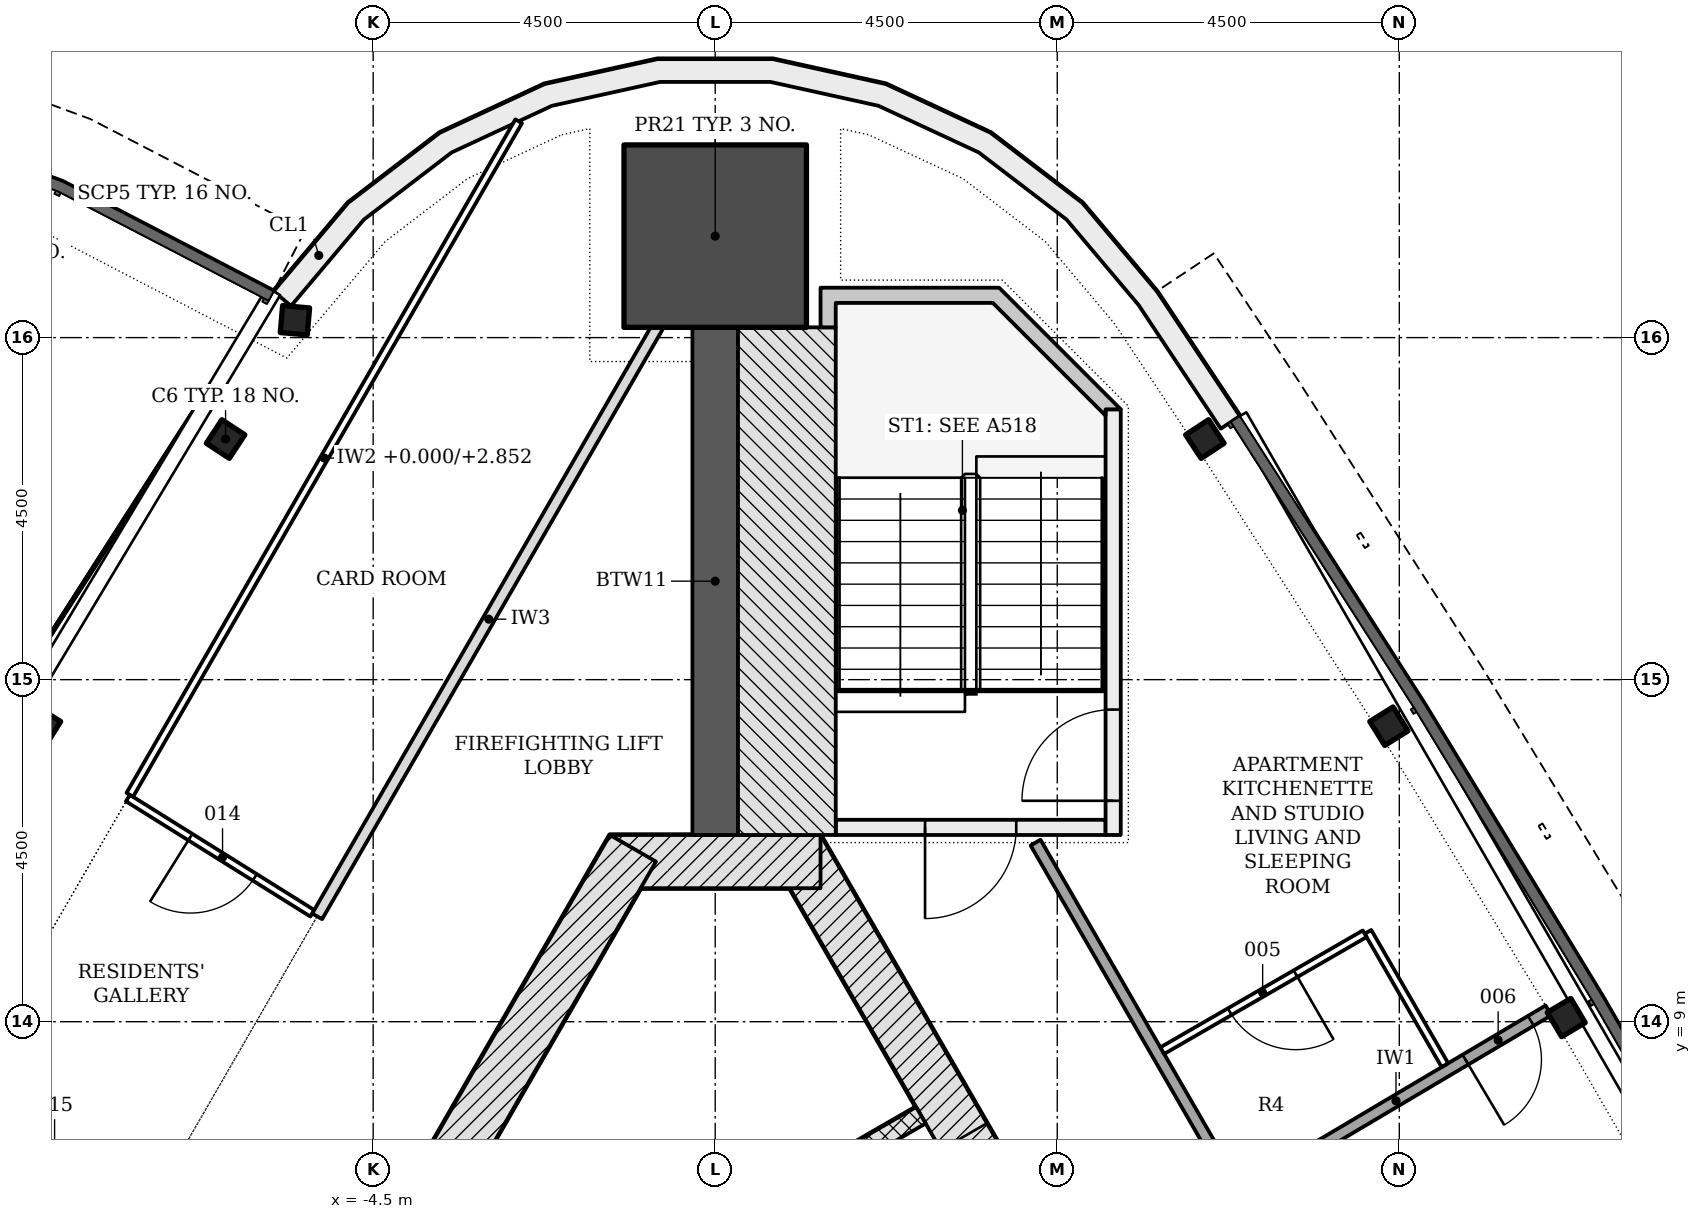
"""IFC4 building model, lengths in metres.
Left out: names, types, materials, properties, quantities, classifications, styles, units other than length and angle.
Written with IfcOpenShell. Run it as: python <this file> out.ifc"""

import sys

from ifc_helpers import new_model, si_unit, direction, frame, frame_2d, origin, origin_2d, place, context, subcontext, project, spatial, polyline, rectangle, hollow_rectangle, i_section, outline, extrude, element, fill, save


model = new_model("IFC4")
c1 = context("Model", 3, precision=1e-05, world=origin(), true_north=direction((0.0, 1.0)))
c2 = subcontext(c1, "Body", "Model", "MODEL_VIEW")
j1 = project(units=[si_unit("LENGTHUNIT", "METRE"), si_unit("PLANEANGLEUNIT", "RADIAN")], contexts=[c1])
p1 = place(None, origin())
s1 = spatial("IfcSite", under=j1, at=p1, CompositionType="ELEMENT")
p2 = place(p1, origin())
s2 = spatial("IfcBuilding", under=s1, at=p2, CompositionType="ELEMENT")
p3 = place(p2, frame((0.0, 0.0, 263.4)))
s3 = spatial("IfcBuildingStorey", under=s2, at=p3, CompositionType="ELEMENT", Elevation=263.4)
p4 = place(p3, frame((10.311, -4.703, -0.2), z_axis=(0.0, 0.0, 1.0), x_axis=(-0.500001446645, 0.866024568562, 0.0)))
e1 = element("IfcWall", 1, at=p4, inside=s3, PredefinedType="SHEAR", context=c2, shape_type="SweptSolid", body=[
    extrude(rectangle(XDim=18.458, YDim=0.7, at=frame_2d((9.229, 0.0))), origin(), (0.0, 0.0, 1.0), 3.6),
])
p5 = place(p4, frame((4.379, 0.0, 0.2)))
e2 = element("IfcOpeningElement", 2, at=p5, cuts=e1, PredefinedType="OPENING", context=c2, shape_type="SweptSolid", body=[
    extrude(rectangle(XDim=1.1, YDim=2.1, at=frame_2d((0.55, 1.05))), frame((0.0, 0.36, 0.0), z_axis=(0.0, -1.0, 0.0), x_axis=(1.0, 0.0, 0.0)), (0.0, 0.0, 1.0), 0.72),
])
p6 = place(p4, frame((6.529, 0.0, 0.2)))
e3 = element("IfcOpeningElement", 3, at=p6, cuts=e1, PredefinedType="OPENING", context=c2, shape_type="SweptSolid", body=[
    extrude(rectangle(XDim=1.1, YDim=2.1, at=frame_2d((0.55, 1.05))), frame((0.0, 0.36, 0.0), z_axis=(0.0, -1.0, 0.0), x_axis=(1.0, 0.0, 0.0)), (0.0, 0.0, 1.0), 0.72),
])
p7 = place(p4, frame((8.679, 0.0, 0.2)))
e4 = element("IfcOpeningElement", 4, at=p7, cuts=e1, PredefinedType="OPENING", context=c2, shape_type="SweptSolid", body=[
    extrude(rectangle(XDim=1.1, YDim=2.1, at=frame_2d((0.55, 1.05))), frame((0.0, 0.36, 0.0), z_axis=(0.0, -1.0, 0.0), x_axis=(1.0, 0.0, 0.0)), (0.0, 0.0, 1.0), 0.72),
])
p8 = place(p4, frame((10.829, 0.0, 0.2)))
e5 = element("IfcOpeningElement", 5, at=p8, cuts=e1, PredefinedType="OPENING", context=c2, shape_type="SweptSolid", body=[
    extrude(rectangle(XDim=1.1, YDim=2.1, at=frame_2d((0.55, 1.05))), frame((0.0, 0.36, 0.0), z_axis=(0.0, -1.0, 0.0), x_axis=(1.0, 0.0, 0.0)), (0.0, 0.0, 1.0), 0.72),
])
p9 = place(p4, frame((12.979, 0.0, 0.2)))
e6 = element("IfcOpeningElement", 6, at=p9, cuts=e1, PredefinedType="OPENING", context=c2, shape_type="SweptSolid", body=[
    extrude(rectangle(XDim=1.1, YDim=2.1, at=frame_2d((0.55, 1.05))), frame((0.0, 0.36, 0.0), z_axis=(0.0, -1.0, 0.0), x_axis=(1.0, 0.0, 0.0)), (0.0, 0.0, 1.0), 0.72),
])
p10 = place(p3, frame((1.386, 11.106, -0.2), z_axis=(0.0, 0.0, 1.0), x_axis=(-1.0, 0.0, 0.0)))
e7 = element("IfcWall", 7, at=p10, inside=s3, PredefinedType="SHEAR", context=c2, shape_type="SweptSolid", body=[
    extrude(rectangle(XDim=2.771, YDim=0.7, at=frame_2d((1.386, 0.0))), origin(), (0.0, 0.0, 1.0), 3.6),
])
p11 = place(p3, frame((-1.083, 11.281, -0.2), z_axis=(0.0, 0.0, 1.0), x_axis=(-0.500001446645, -0.866024568562, 0.0)))
e8 = element("IfcWall", 8, at=p11, inside=s3, PredefinedType="SHEAR", context=c2, shape_type="SweptSolid", body=[
    extrude(rectangle(XDim=18.458, YDim=0.7, at=frame_2d((9.229, 0.0))), origin(), (0.0, 0.0, 1.0), 3.6),
])
p12 = place(p11, frame((8.979, 0.0, 0.2)))
e9 = element("IfcOpeningElement", 9, at=p12, cuts=e8, PredefinedType="OPENING", context=c2, shape_type="SweptSolid", body=[
    extrude(rectangle(XDim=1.2, YDim=2.1, at=frame_2d((0.6, 1.05))), frame((0.0, 0.36, 0.0), z_axis=(0.0, -1.0, 0.0), x_axis=(1.0, 0.0, 0.0)), (0.0, 0.0, 1.0), 0.72),
])
p13 = place(p11, frame((11.029, 0.0, 0.2)))
e10 = element("IfcOpeningElement", 10, at=p13, cuts=e8, PredefinedType="OPENING", context=c2, shape_type="SweptSolid", body=[
    extrude(rectangle(XDim=1.2, YDim=2.1, at=frame_2d((0.6, 1.05))), frame((0.0, 0.36, 0.0), z_axis=(0.0, -1.0, 0.0), x_axis=(1.0, 0.0, 0.0)), (0.0, 0.0, 1.0), 0.72),
])
p14 = place(p3, frame((0.0, 11.456, -0.2), z_axis=(0.0, 0.0, 1.0), x_axis=(0.0, 1.0, 0.0)))
e11 = element("IfcWall", 11, at=p14, inside=s3, PredefinedType="SHEAR", context=c2, shape_type="SweptSolid", body=[
    extrude(rectangle(XDim=6.679, YDim=0.6, at=frame_2d((3.339, 0.0))), origin(), (0.0, 0.0, 1.0), 3.6),
])
p15 = place(p3, frame((0.0, 19.335, -0.2), z_axis=(0.0, 0.0, 1.0), x_axis=(0.0, 1.0, 0.0)))
e12 = element("IfcColumn", 12, at=p15, inside=s3, PredefinedType="COLUMN", context=c2, shape_type="SweptSolid", body=[
    extrude(rectangle(XDim=2.4, YDim=2.4, at=origin_2d()), origin(), (0.0, 0.0, 1.0), 3.6),
])
for number, where, z_axis, x_axis in (
    (13, (-6.442, 16.666, -0.2), (0.0, 0.0, 1.0), (-0.549, -0.836, 0.0)),
    (14, (-8.863, 12.888, -0.2), (0.0, 0.0, 1.0), (-0.53, -0.848, 0.0)),
    (15, (11.196, 9.055, -0.2), (0.0, 0.0, 1.0), (-0.51, 0.86, 0.0)),
    (16, (8.863, 12.888, -0.2), (0.0, 0.0, 1.0), (-0.53, 0.848, 0.0)),
    (17, (6.442, 16.666, -0.2), (0.0, 0.0, 1.0), (-0.549, 0.836, 0.0)),
):
    element("IfcColumn", number, at=place(p3, frame(where, z_axis=z_axis, x_axis=x_axis)), inside=s3, PredefinedType="COLUMN", context=c2, shape_type="SweptSolid", body=[
        extrude(i_section(OverallWidth=0.371, OverallDepth=0.361, WebThickness=0.012, FlangeThickness=0.02, FilletRadius=0.015, at=origin_2d()), origin(), (0.0, 0.0, 1.0), 3.6),
    ])
p16 = place(p3, frame((-5.529, 18.228, -0.2), z_axis=(0.0, 0.0, 1.0), x_axis=(-0.996283580932, 0.086133770183, 0.0)))
e18 = element("IfcColumn", 18, at=p16, inside=s3, PredefinedType="COLUMN", context=c2, shape_type="SweptSolid", body=[
    extrude(hollow_rectangle(XDim=0.356, YDim=0.356, WallThickness=0.013, at=origin_2d()), origin(), (0.0, 0.0, 1.0), 3.6),
])
p17 = place(p3, origin())
e19 = element("IfcWall", 19, at=p17, inside=s3, PredefinedType="NOTDEFINED", context=c2, shape_type="SweptSolid", body=[
    extrude(outline(polyline([(6.901, 16.968), (5.81, 18.61), (4.83, 19.771), (3.623, 20.695), (2.244, 21.335), (0.76, 21.664), (-0.76, 21.664), (-2.244, 21.335), (-3.623, 20.695), (-4.83, 19.771), (-5.81, 18.61), (-5.58, 18.416), (-4.622, 19.553), (-3.466, 20.437), (-2.147, 21.05), (-0.727, 21.364), (0.727, 21.364), (2.147, 21.05), (3.466, 20.437), (4.622, 19.553), (5.569, 18.429), (6.651, 16.802), (6.901, 16.968)])), origin(), (0.0, 0.0, 1.0), 3.3),
])
p18 = place(p3, frame((2.706, 7.769, -0.2), z_axis=(0.0, 0.0, 1.0), x_axis=(-0.866022959057, -0.500004234368, 0.0)))
e20 = element("IfcWall", 20, at=p18, inside=s3, PredefinedType="PARTITIONING", context=c2, shape_type="SweptSolid", body=[
    extrude(rectangle(XDim=2.5, YDim=0.25, at=frame_2d((1.25, 0.0))), origin(), (0.0, 0.0, 1.0), 3.6),
])
p19 = place(p3, frame((5.135, 11.556, -0.2), z_axis=(0.0, 0.0, 1.0), x_axis=(-1.0, 0.0, 0.0)))
e21 = element("IfcWall", 21, at=p19, inside=s3, PredefinedType="SHEAR", context=c2, shape_type="SweptSolid", body=[
    extrude(rectangle(XDim=3.55, YDim=0.2, at=frame_2d((1.775, 0.0))), origin(), (0.0, 0.0, 1.0), 3.6),
])
p20 = place(p19, frame((1.175, 0.0, 0.2)))
e22 = element("IfcOpeningElement", 22, at=p20, cuts=e21, PredefinedType="OPENING", context=c2, shape_type="SweptSolid", body=[
    extrude(rectangle(XDim=1.2, YDim=2.1, at=frame_2d((0.6, 1.05))), frame((0.0, 0.11, 0.0), z_axis=(0.0, -1.0, 0.0), x_axis=(1.0, 0.0, 0.0)), (0.0, 0.0, 1.0), 0.22),
])
p21 = place(p3, frame((5.236, 11.456, -0.2), z_axis=(0.0, 0.0, 1.0), x_axis=(0.0, 1.0, 0.0)))
e23 = element("IfcWall", 23, at=p21, inside=s3, PredefinedType="SHEAR", context=c2, shape_type="SweptSolid", body=[
    extrude(rectangle(XDim=5.6, YDim=0.2, at=frame_2d((2.8, 0.0))), origin(), (0.0, 0.0, 1.0), 3.6),
])
p22 = place(p21, frame((0.45, 0.0, 0.2)))
e24 = element("IfcOpeningElement", 24, at=p22, cuts=e23, PredefinedType="OPENING", context=c2, shape_type="SweptSolid", body=[
    extrude(rectangle(XDim=1.2, YDim=2.1, at=frame_2d((0.6, 1.05))), frame((0.0, 0.11, 0.0), z_axis=(0.0, -1.0, 0.0), x_axis=(1.0, 0.0, 0.0)), (0.0, 0.0, 1.0), 0.22),
])
p23 = place(p3, frame((0.943, 11.456, -0.2), z_axis=(0.0, 0.0, 1.0), x_axis=(0.0, 1.0, 0.0)))
e25 = element("IfcWall", 25, at=p23, inside=s3, PredefinedType="SHEAR", context=c2, shape_type="SweptSolid", body=[
    extrude(rectangle(XDim=6.679, YDim=1.286, at=frame_2d((3.339, 0.0))), origin(), (0.0, 0.0, 1.0), 3.6),
])
p24 = place(p3, frame((0.0, 0.0, -0.2)))
e26 = element("IfcWall", 26, at=p24, inside=s3, PredefinedType="SHEAR", context=c2, shape_type="SweptSolid", body=[
    extrude(outline(polyline([(5.336, 17.056), (3.736, 18.656), (1.385, 18.656), (1.385, 18.135), (1.586, 18.135), (1.586, 18.456), (3.653, 18.456), (5.135, 16.974), (5.135, 17.056), (5.135, 17.056), (5.135, 17.056), (5.135, 17.056), (5.135, 17.056), (5.135, 17.056), (5.135, 17.056), (5.135, 17.056), (5.135, 17.056), (5.135, 17.056), (5.135, 17.056), (5.135, 17.056), (5.135, 17.056), (5.135, 17.056), (5.135, 17.056), (5.135, 17.056), (5.135, 17.056), (5.336, 17.056)])), origin(), (0.0, 0.0, 1.0), 3.6),
])
p25 = place(p3, frame((6.885, 6.731, 0.0), z_axis=(0.0, 0.0, 1.0), x_axis=(-0.500003399299, 0.866023441189, 0.0)))
e27 = element("IfcWall", 27, at=p25, inside=s3, PredefinedType="PARTITIONING", context=c2, shape_type="SweptSolid", body=[
    extrude(rectangle(XDim=5.341, YDim=0.15, at=frame_2d((2.67, 0.0))), origin(), (0.0, 0.0, 1.0), 2.852),
])
p26 = place(p3, frame((10.963, 9.149, 0.0), z_axis=(0.0, 0.0, 1.0), x_axis=(-0.860158922337, -0.510026105532, 0.0)))
e28 = element("IfcWall", 28, at=p26, inside=s3, PredefinedType="PARTITIONING", context=c2, shape_type="SweptSolid", body=[
    extrude(rectangle(XDim=4.666, YDim=0.15, at=frame_2d((2.333, 0.0))), origin(), (0.0, 0.0, 1.0), 3.4),
])
p27 = place(p26, frame((0.27, 0.0, 0.0)))
e29 = element("IfcOpeningElement", 29, at=p27, cuts=e28, PredefinedType="OPENING", context=c2, shape_type="SweptSolid", body=[
    extrude(rectangle(XDim=1.0, YDim=2.1, at=frame_2d((0.5, 1.05))), frame((0.0, 0.085, 0.0), z_axis=(0.0, -1.0, 0.0), x_axis=(1.0, 0.0, 0.0)), (0.0, 0.0, 1.0), 0.17),
])
p28 = place(p3, frame((9.6, 8.428, 0.0), z_axis=(0.0, 0.0, 1.0), x_axis=(-0.499990325971, 0.866030989016, 0.0)))
e30 = element("IfcWall", 30, at=p28, inside=s3, PredefinedType="PARTITIONING", context=c2, shape_type="SweptSolid", body=[
    extrude(rectangle(XDim=2.025, YDim=0.1, at=frame_2d((1.012, 0.0))), origin(), (0.0, 0.0, 1.0), 3.4),
])
p29 = place(p3, frame((8.544, 10.157, 0.0), z_axis=(0.0, 0.0, 1.0), x_axis=(-0.866016353143, -0.500015675843, 0.0)))
e31 = element("IfcWall", 31, at=p29, inside=s3, PredefinedType="PARTITIONING", context=c2, shape_type="SweptSolid", body=[
    extrude(rectangle(XDim=3.075, YDim=0.1, at=frame_2d((1.538, 0.0))), origin(), (0.0, 0.0, 1.0), 3.4),
])
p30 = place(p29, frame((1.05, 0.0, 0.0)))
e32 = element("IfcOpeningElement", 32, at=p30, cuts=e31, PredefinedType="OPENING", context=c2, shape_type="SweptSolid", body=[
    extrude(rectangle(XDim=1.0, YDim=2.1, at=frame_2d((0.5, 1.05))), frame((0.0, 0.06, 0.0), z_axis=(0.0, -1.0, 0.0), x_axis=(1.0, 0.0, 0.0)), (0.0, 0.0, 1.0), 0.12),
])
p31 = place(p3, frame((-0.723, 18.205, 0.0), z_axis=(0.0, 0.0, 1.0), x_axis=(-0.500010391421, -0.866019404212, 0.0)))
e33 = element("IfcWall", 33, at=p31, inside=s3, PredefinedType="PARTITIONING", context=c2, shape_type="SweptSolid", body=[
    extrude(rectangle(XDim=9.028, YDim=0.15, at=frame_2d((4.514, 0.0))), origin(), (0.0, 0.0, 1.0), 2.852),
])
p32 = place(p3, frame((-5.3, 10.426, 0.0), z_axis=(0.0, 0.0, 1.0), x_axis=(-0.84806062783, 0.529899208835, 0.0)))
e34 = element("IfcWall", 34, at=p32, inside=s3, PredefinedType="PARTITIONING", context=c2, shape_type="SweptSolid", body=[
    extrude(rectangle(XDim=2.861, YDim=0.1, at=frame_2d((1.43, 0.0))), origin(), (0.0, 0.0, 1.0), 3.4),
])
p33 = place(p32, frame((0.893, 0.0, 0.0)))
e35 = element("IfcOpeningElement", 35, at=p33, cuts=e34, PredefinedType="OPENING", context=c2, shape_type="SweptSolid", body=[
    extrude(rectangle(XDim=1.0, YDim=2.1, at=frame_2d((0.5, 1.05))), frame((0.0, 0.06, 0.0), z_axis=(0.0, -1.0, 0.0), x_axis=(1.0, 0.0, 0.0)), (0.0, 0.0, 1.0), 0.12),
])
p34 = place(p3, frame((-7.494, 6.627, 0.0), z_axis=(0.0, 0.0, 1.0), x_axis=(-0.860170843297, 0.510006000299, 0.0)))
e36 = element("IfcWall", 36, at=p34, inside=s3, PredefinedType="PARTITIONING", context=c2, shape_type="SweptSolid", body=[
    extrude(rectangle(XDim=2.859, YDim=0.1, at=frame_2d((1.43, 0.0))), origin(), (0.0, 0.0, 1.0), 3.4),
])
p35 = place(p34, frame((0.642, 0.0, 0.0)))
e37 = element("IfcOpeningElement", 37, at=p35, cuts=e36, PredefinedType="OPENING", context=c2, shape_type="SweptSolid", body=[
    extrude(rectangle(XDim=1.5, YDim=2.1, at=frame_2d((0.75, 1.05))), frame((0.0, 0.06, 0.0), z_axis=(0.0, -1.0, 0.0), x_axis=(1.0, 0.0, 0.0)), (0.0, 0.0, 1.0), 0.12),
])
p36 = place(p3, frame((-2.586, 20.846, 0.0), z_axis=(0.0, 0.0, 1.0), x_axis=(-0.499993724355, -0.866029026999, 0.0)))
e38 = element("IfcWall", 38, at=p36, inside=s3, PredefinedType="PARTITIONING", context=c2, shape_type="SweptSolid", body=[
    extrude(rectangle(XDim=10.232, YDim=0.1, at=frame_2d((5.116, 0.0))), origin(), (0.0, 0.0, 1.0), 2.852),
])
p37 = place(p9, origin())
e39 = element("IfcDoor", 39, at=p37, inside=s3, OperationType="DOUBLE_DOOR_SLIDING", PredefinedType="DOOR", context=c2, shape_type="SweptSolid", body=[
    extrude(rectangle(XDim=1.1, YDim=2.1, at=frame_2d((0.55, 1.05))), frame((0.0, 0.025, 0.0), z_axis=(0.0, -1.0, 0.0), x_axis=(1.0, 0.0, 0.0)), (0.0, 0.0, 1.0), 0.05),
])
fill(e6, e39)
p38 = place(p20, origin())
e40 = element("IfcDoor", 40, at=p38, inside=s3, OperationType="SINGLE_SWING_RIGHT", PredefinedType="DOOR", context=c2, shape_type="SweptSolid", body=[
    extrude(rectangle(XDim=1.2, YDim=2.1, at=frame_2d((0.6, 1.05))), frame((0.0, 0.025, 0.0), z_axis=(0.0, -1.0, 0.0), x_axis=(1.0, 0.0, 0.0)), (0.0, 0.0, 1.0), 0.05),
])
fill(e22, e40)
p39 = place(p22, origin())
e41 = element("IfcDoor", 41, at=p39, inside=s3, OperationType="SINGLE_SWING_LEFT", PredefinedType="DOOR", context=c2, shape_type="SweptSolid", body=[
    extrude(rectangle(XDim=1.2, YDim=2.1, at=frame_2d((0.6, 1.05))), frame((0.0, 0.025, 0.0), z_axis=(0.0, -1.0, 0.0), x_axis=(1.0, 0.0, 0.0)), (0.0, 0.0, 1.0), 0.05),
])
fill(e24, e41)
p40 = place(p30, origin())
e42 = element("IfcDoor", 42, at=p40, inside=s3, OperationType="SINGLE_SWING_LEFT", PredefinedType="DOOR", context=c2, shape_type="SweptSolid", body=[
    extrude(rectangle(XDim=1.0, YDim=2.1, at=frame_2d((0.5, 1.05))), frame((0.0, 0.025, 0.0), z_axis=(0.0, -1.0, 0.0), x_axis=(1.0, 0.0, 0.0)), (0.0, 0.0, 1.0), 0.05),
])
fill(e32, e42)
p41 = place(p27, origin())
e43 = element("IfcDoor", 43, at=p41, inside=s3, OperationType="SINGLE_SWING_RIGHT", PredefinedType="DOOR", context=c2, shape_type="SweptSolid", body=[
    extrude(rectangle(XDim=1.0, YDim=2.1, at=frame_2d((0.5, 1.05))), frame((0.0, 0.025, 0.0), z_axis=(0.0, -1.0, 0.0), x_axis=(1.0, 0.0, 0.0)), (0.0, 0.0, 1.0), 0.05),
])
fill(e29, e43)
p42 = place(p33, origin())
e44 = element("IfcDoor", 44, at=p42, inside=s3, OperationType="SINGLE_SWING_RIGHT", PredefinedType="DOOR", context=c2, shape_type="SweptSolid", body=[
    extrude(rectangle(XDim=1.0, YDim=2.1, at=frame_2d((0.5, 1.05))), frame((0.0, 0.025, 0.0), z_axis=(0.0, -1.0, 0.0), x_axis=(1.0, 0.0, 0.0)), (0.0, 0.0, 1.0), 0.05),
])
fill(e35, e44)
p43 = place(p35, origin())
e45 = element("IfcDoor", 45, at=p43, inside=s3, OperationType="DOUBLE_DOOR_SINGLE_SWING", PredefinedType="DOOR", context=c2, shape_type="SweptSolid", body=[
    extrude(rectangle(XDim=1.5, YDim=2.1, at=frame_2d((0.75, 1.05))), frame((0.0, 0.025, 0.0), z_axis=(0.0, -1.0, 0.0), x_axis=(1.0, 0.0, 0.0)), (0.0, 0.0, 1.0), 0.05),
])
fill(e37, e45)
save(model, sys.argv[1])
